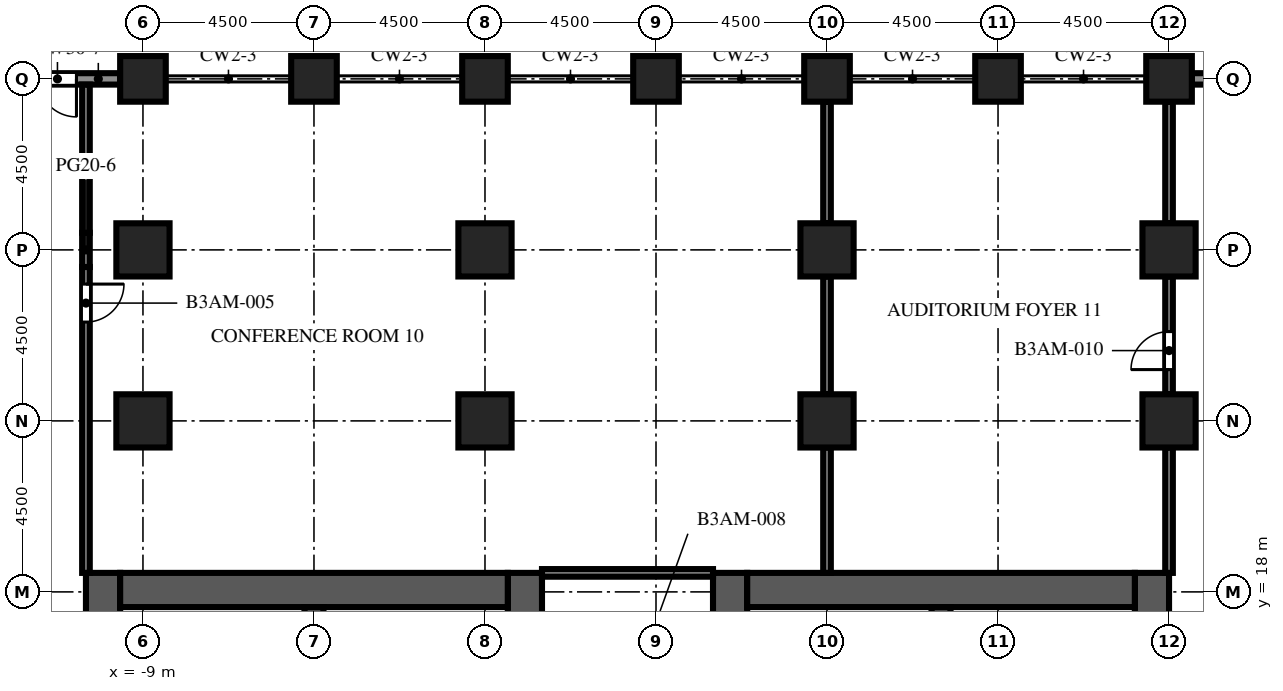
"""IFC4 building model, lengths in metres.
Left out: names, types, materials, properties, quantities, classifications, styles, units other than length and angle.
Written with IfcOpenShell. Run it as: python <this file> out.ifc"""

import sys

from ifc_helpers import new_model, si_unit, direction, frame, frame_2d, origin, origin_2d, place, context, subcontext, project, spatial, rectangle, extrude, element, fill, save


model = new_model("IFC4")
c1 = context("Model", 3, precision=1e-05, world=origin(), true_north=direction((0.0, 1.0)))
c2 = subcontext(c1, "Body", "Model", "MODEL_VIEW")
j1 = project(units=[si_unit("LENGTHUNIT", "METRE"), si_unit("PLANEANGLEUNIT", "RADIAN")], contexts=[c1])
p1 = place(None, origin())
s1 = spatial("IfcSite", under=j1, at=p1, CompositionType="ELEMENT")
p2 = place(p1, origin())
s2 = spatial("IfcBuilding", under=s1, at=p2, CompositionType="ELEMENT")
p3 = place(p2, frame((0.0, 0.0, 110.7)))
s3 = spatial("IfcBuildingStorey", under=s2, at=p3, CompositionType="ELEMENT", Elevation=110.7)
for number, where, z_axis, x_axis in (
    (1, (-9.0, 31.5, 0.0), (0.0, 0.0, 1.0), (1.0, 0.0, 0.0)),
    (2, (-4.5, 31.5, 0.0), (0.0, 0.0, 1.0), (1.0, 0.0, 0.0)),
    (3, (0.0, 31.5, 0.0), (0.0, 0.0, 1.0), (1.0, 0.0, 0.0)),
    (4, (4.5, 31.5, 0.0), (0.0, 0.0, 1.0), (1.0, 0.0, 0.0)),
    (5, (9.0, 31.5, 0.0), (0.0, 0.0, 1.0), (1.0, 0.0, 0.0)),
    (6, (13.5, 31.5, 0.0), (0.0, 0.0, 1.0), (1.0, 0.0, 0.0)),
    (7, (18.0, 31.5, 0.0), (0.0, 0.0, 1.0), (1.0, 0.0, 0.0)),
):
    element("IfcColumn", number, at=place(p3, frame(where, z_axis=z_axis, x_axis=x_axis)), inside=s3, PredefinedType="COLUMN", context=c2, shape_type="SweptSolid", body=[
        extrude(rectangle(XDim=1.2, YDim=1.2, at=origin_2d()), origin(), (0.0, 0.0, 1.0), 6.0),
    ])
p4 = place(p3, frame((-9.0, 22.5, 0.0), z_axis=(0.0, 0.0, 1.0), x_axis=(1.0, 0.0, 0.0)))
e8 = element("IfcColumn", 8, at=p4, inside=s3, PredefinedType="COLUMN", context=c2, shape_type="SweptSolid", body=[
    extrude(rectangle(XDim=1.4, YDim=1.4, at=origin_2d()), origin(), (0.0, 0.0, 1.0), 6.0),
])
p5 = place(p3, frame((-9.0, 27.0, 0.0), z_axis=(0.0, 0.0, 1.0), x_axis=(1.0, 0.0, 0.0)))
e9 = element("IfcColumn", 9, at=p5, inside=s3, PredefinedType="COLUMN", context=c2, shape_type="SweptSolid", body=[
    extrude(rectangle(XDim=1.4, YDim=1.4, at=origin_2d()), origin(), (0.0, 0.0, 1.0), 5.55),
])
for number, where, z_axis, x_axis in (
    (10, (0.0, 22.5, 0.0), (0.0, 0.0, 1.0), (1.0, 0.0, 0.0)),
    (11, (0.0, 27.0, 0.0), (0.0, 0.0, 1.0), (1.0, 0.0, 0.0)),
    (12, (9.0, 22.5, 0.0), (0.0, 0.0, 1.0), (1.0, 0.0, 0.0)),
    (13, (9.0, 27.0, 0.0), (0.0, 0.0, 1.0), (1.0, 0.0, 0.0)),
    (14, (18.0, 22.5, 0.0), (0.0, 0.0, 1.0), (1.0, 0.0, 0.0)),
    (15, (18.0, 27.0, 0.0), (0.0, 0.0, 1.0), (1.0, 0.0, 0.0)),
):
    element("IfcColumn", number, at=place(p3, frame(where, z_axis=z_axis, x_axis=x_axis)), inside=s3, PredefinedType="COLUMN", context=c2, shape_type="SweptSolid", body=[
        extrude(rectangle(XDim=1.4, YDim=1.4, at=origin_2d()), origin(), (0.0, 0.0, 1.0), 6.0),
    ])
p6 = place(p3, frame((-10.05, -9.0, 0.0), z_axis=(0.0, 0.0, 1.0), x_axis=(0.0, 1.0, 0.0)))
e16 = element("IfcWall", 16, at=p6, inside=s3, PredefinedType="SHEAR", context=c2, shape_type="SweptSolid", body=[
    extrude(rectangle(XDim=27.5, YDim=0.9, at=frame_2d((13.75, 0.0))), origin(), (0.0, 0.0, 1.0), 6.0),
])
p7 = place(p6, frame((12.55, 0.0, 0.0)))
e17 = element("IfcOpeningElement", 17, at=p7, cuts=e16, PredefinedType="OPENING", context=c2, shape_type="SweptSolid", body=[
    extrude(rectangle(XDim=2.4, YDim=2.4, at=frame_2d((1.2, 1.2))), frame((0.0, 0.46, 0.0), z_axis=(0.0, -1.0, 0.0), x_axis=(1.0, 0.0, 0.0)), (0.0, 0.0, 1.0), 0.92),
])
p8 = place(p6, frame((6.825, 0.0, 0.0)))
e18 = element("IfcOpeningElement", 18, at=p8, cuts=e16, PredefinedType="OPENING", context=c2, shape_type="SweptSolid", body=[
    extrude(rectangle(XDim=1.2, YDim=2.1, at=frame_2d((0.6, 1.05))), frame((0.0, 0.46, 0.0), z_axis=(0.0, -1.0, 0.0), x_axis=(1.0, 0.0, 0.0)), (0.0, 0.0, 1.0), 0.92),
])
p9 = place(p6, frame((19.475, 0.0, 0.0)))
e19 = element("IfcOpeningElement", 19, at=p9, cuts=e16, PredefinedType="OPENING", context=c2, shape_type="SweptSolid", body=[
    extrude(rectangle(XDim=1.2, YDim=2.1, at=frame_2d((0.6, 1.05))), frame((0.0, 0.46, 0.0), z_axis=(0.0, -1.0, 0.0), x_axis=(1.0, 0.0, 0.0)), (0.0, 0.0, 1.0), 0.92),
])
p10 = place(p3, frame((1.05, -9.0, 0.0), z_axis=(0.0, 0.0, 1.0), x_axis=(0.0, 1.0, 0.0)))
e20 = element("IfcWall", 20, at=p10, inside=s3, PredefinedType="SHEAR", context=c2, shape_type="SweptSolid", body=[
    extrude(rectangle(XDim=27.5, YDim=0.9, at=frame_2d((13.75, 0.0))), origin(), (0.0, 0.0, 1.0), 6.0),
])
p11 = place(p10, frame((12.55, 0.0, 0.0)))
e21 = element("IfcOpeningElement", 21, at=p11, cuts=e20, PredefinedType="OPENING", context=c2, shape_type="SweptSolid", body=[
    extrude(rectangle(XDim=2.4, YDim=2.4, at=frame_2d((1.2, 1.2))), frame((0.0, 0.46, 0.0), z_axis=(0.0, -1.0, 0.0), x_axis=(1.0, 0.0, 0.0)), (0.0, 0.0, 1.0), 0.92),
])
p12 = place(p10, frame((3.975, 0.0, 0.0)))
e22 = element("IfcOpeningElement", 22, at=p12, cuts=e20, PredefinedType="OPENING", context=c2, shape_type="SweptSolid", body=[
    extrude(rectangle(XDim=1.2, YDim=2.1, at=frame_2d((0.6, 1.05))), frame((0.0, 0.46, 0.0), z_axis=(0.0, -1.0, 0.0), x_axis=(1.0, 0.0, 0.0)), (0.0, 0.0, 1.0), 0.92),
])
p13 = place(p10, frame((19.485, 0.0, 0.0)))
e23 = element("IfcOpeningElement", 23, at=p13, cuts=e20, PredefinedType="OPENING", context=c2, shape_type="SweptSolid", body=[
    extrude(rectangle(XDim=1.0, YDim=2.1, at=frame_2d((0.5, 1.05))), frame((0.0, 0.46, 0.0), z_axis=(0.0, -1.0, 0.0), x_axis=(1.0, 0.0, 0.0)), (0.0, 0.0, 1.0), 0.92),
])
p14 = place(p10, frame((21.139, 0.0, 0.0)))
e24 = element("IfcOpeningElement", 24, at=p14, cuts=e20, PredefinedType="OPENING", context=c2, shape_type="SweptSolid", body=[
    extrude(rectangle(XDim=1.0, YDim=2.1, at=frame_2d((0.5, 1.05))), frame((0.0, 0.46, 0.0), z_axis=(0.0, -1.0, 0.0), x_axis=(1.0, 0.0, 0.0)), (0.0, 0.0, 1.0), 0.92),
])
p15 = place(p10, frame((23.16, 0.0, 0.0)))
e25 = element("IfcOpeningElement", 25, at=p15, cuts=e20, PredefinedType="OPENING", context=c2, shape_type="SweptSolid", body=[
    extrude(rectangle(XDim=1.0, YDim=2.1, at=frame_2d((0.5, 1.05))), frame((0.0, 0.46, 0.0), z_axis=(0.0, -1.0, 0.0), x_axis=(1.0, 0.0, 0.0)), (0.0, 0.0, 1.0), 0.92),
])
p16 = place(p10, frame((25.181, 0.0, 0.0)))
e26 = element("IfcOpeningElement", 26, at=p16, cuts=e20, PredefinedType="OPENING", context=c2, shape_type="SweptSolid", body=[
    extrude(rectangle(XDim=1.0, YDim=2.1, at=frame_2d((0.5, 1.05))), frame((0.0, 0.46, 0.0), z_axis=(0.0, -1.0, 0.0), x_axis=(1.0, 0.0, 0.0)), (0.0, 0.0, 1.0), 0.92),
])
p17 = place(p3, frame((-9.6, 18.05, 0.0), z_axis=(0.0, 0.0, 1.0), x_axis=(1.0, 0.0, 0.0)))
e27 = element("IfcWall", 27, at=p17, inside=s3, PredefinedType="SHEAR", context=c2, shape_type="SweptSolid", body=[
    extrude(rectangle(XDim=10.2, YDim=0.9, at=frame_2d((5.1, 0.0))), origin(), (0.0, 0.0, 1.0), 6.0),
])
p18 = place(p3, frame((-4.5, 10.25, 0.0), z_axis=(0.0, 0.0, 1.0), x_axis=(0.0, 1.0, 0.0)))
e28 = element("IfcWall", 28, at=p18, inside=s3, PredefinedType="SHEAR", context=c2, shape_type="SweptSolid", body=[
    extrude(rectangle(XDim=7.35, YDim=0.5, at=frame_2d((3.675, 0.0))), origin(), (0.0, 0.0, 1.0), 6.0),
])
p19 = place(p3, frame((6.45, -9.0, 0.0), z_axis=(0.0, 0.0, 1.0), x_axis=(0.0, 1.0, 0.0)))
e29 = element("IfcWall", 29, at=p19, inside=s3, PredefinedType="SHEAR", context=c2, shape_type="SweptSolid", body=[
    extrude(rectangle(XDim=27.5, YDim=0.9, at=frame_2d((13.75, 0.0))), origin(), (0.0, 0.0, 1.0), 6.0),
])
p20 = place(p19, frame((12.55, 0.0, 0.0)))
e30 = element("IfcOpeningElement", 30, at=p20, cuts=e29, PredefinedType="OPENING", context=c2, shape_type="SweptSolid", body=[
    extrude(rectangle(XDim=2.4, YDim=2.4, at=frame_2d((1.2, 1.2))), frame((0.0, 0.46, 0.0), z_axis=(0.0, -1.0, 0.0), x_axis=(1.0, 0.0, 0.0)), (0.0, 0.0, 1.0), 0.92),
])
p21 = place(p19, frame((3.975, 0.0, 0.0)))
e31 = element("IfcOpeningElement", 31, at=p21, cuts=e29, PredefinedType="OPENING", context=c2, shape_type="SweptSolid", body=[
    extrude(rectangle(XDim=1.2, YDim=2.1, at=frame_2d((0.6, 1.05))), frame((0.0, 0.46, 0.0), z_axis=(0.0, -1.0, 0.0), x_axis=(1.0, 0.0, 0.0)), (0.0, 0.0, 1.0), 0.92),
])
p22 = place(p19, frame((19.485, 0.0, 0.0)))
e32 = element("IfcOpeningElement", 32, at=p22, cuts=e29, PredefinedType="OPENING", context=c2, shape_type="SweptSolid", body=[
    extrude(rectangle(XDim=1.0, YDim=2.1, at=frame_2d((0.5, 1.05))), frame((0.0, 0.46, 0.0), z_axis=(0.0, -1.0, 0.0), x_axis=(1.0, 0.0, 0.0)), (0.0, 0.0, 1.0), 0.92),
])
p23 = place(p19, frame((21.139, 0.0, 0.0)))
e33 = element("IfcOpeningElement", 33, at=p23, cuts=e29, PredefinedType="OPENING", context=c2, shape_type="SweptSolid", body=[
    extrude(rectangle(XDim=1.0, YDim=2.1, at=frame_2d((0.5, 1.05))), frame((0.0, 0.46, 0.0), z_axis=(0.0, -1.0, 0.0), x_axis=(1.0, 0.0, 0.0)), (0.0, 0.0, 1.0), 0.92),
])
p24 = place(p19, frame((23.16, 0.0, 0.0)))
e34 = element("IfcOpeningElement", 34, at=p24, cuts=e29, PredefinedType="OPENING", context=c2, shape_type="SweptSolid", body=[
    extrude(rectangle(XDim=1.0, YDim=2.1, at=frame_2d((0.5, 1.05))), frame((0.0, 0.46, 0.0), z_axis=(0.0, -1.0, 0.0), x_axis=(1.0, 0.0, 0.0)), (0.0, 0.0, 1.0), 0.92),
])
p25 = place(p19, frame((25.181, 0.0, 0.0)))
e35 = element("IfcOpeningElement", 35, at=p25, cuts=e29, PredefinedType="OPENING", context=c2, shape_type="SweptSolid", body=[
    extrude(rectangle(XDim=1.0, YDim=2.1, at=frame_2d((0.5, 1.05))), frame((0.0, 0.46, 0.0), z_axis=(0.0, -1.0, 0.0), x_axis=(1.0, 0.0, 0.0)), (0.0, 0.0, 1.0), 0.92),
])
p26 = place(p3, frame((17.55, -9.0, 0.0), z_axis=(0.0, 0.0, 1.0), x_axis=(0.0, 1.0, 0.0)))
e36 = element("IfcWall", 36, at=p26, inside=s3, PredefinedType="SHEAR", context=c2, shape_type="SweptSolid", body=[
    extrude(rectangle(XDim=27.5, YDim=0.9, at=frame_2d((13.75, 0.0))), origin(), (0.0, 0.0, 1.0), 6.0),
])
p27 = place(p26, frame((12.55, 0.0, 0.0)))
e37 = element("IfcOpeningElement", 37, at=p27, cuts=e36, PredefinedType="OPENING", context=c2, shape_type="SweptSolid", body=[
    extrude(rectangle(XDim=2.4, YDim=2.4, at=frame_2d((1.2, 1.2))), frame((0.0, 0.46, 0.0), z_axis=(0.0, -1.0, 0.0), x_axis=(1.0, 0.0, 0.0)), (0.0, 0.0, 1.0), 0.92),
])
p28 = place(p26, frame((6.825, 0.0, 0.0)))
e38 = element("IfcOpeningElement", 38, at=p28, cuts=e36, PredefinedType="OPENING", context=c2, shape_type="SweptSolid", body=[
    extrude(rectangle(XDim=1.2, YDim=2.1, at=frame_2d((0.6, 1.05))), frame((0.0, 0.46, 0.0), z_axis=(0.0, -1.0, 0.0), x_axis=(1.0, 0.0, 0.0)), (0.0, 0.0, 1.0), 0.92),
])
p29 = place(p26, frame((19.475, 0.0, 0.0)))
e39 = element("IfcOpeningElement", 39, at=p29, cuts=e36, PredefinedType="OPENING", context=c2, shape_type="SweptSolid", body=[
    extrude(rectangle(XDim=1.2, YDim=2.1, at=frame_2d((0.6, 1.05))), frame((0.0, 0.46, 0.0), z_axis=(0.0, -1.0, 0.0), x_axis=(1.0, 0.0, 0.0)), (0.0, 0.0, 1.0), 0.92),
])
p30 = place(p3, frame((6.9, 18.05, 0.0), z_axis=(0.0, 0.0, 1.0), x_axis=(1.0, 0.0, 0.0)))
e40 = element("IfcWall", 40, at=p30, inside=s3, PredefinedType="SHEAR", context=c2, shape_type="SweptSolid", body=[
    extrude(rectangle(XDim=10.2, YDim=0.9, at=frame_2d((5.1, 0.0))), origin(), (0.0, 0.0, 1.0), 6.0),
])
p31 = place(p3, frame((12.0, 10.25, 0.0), z_axis=(0.0, 0.0, 1.0), x_axis=(0.0, 1.0, 0.0)))
e41 = element("IfcWall", 41, at=p31, inside=s3, PredefinedType="SHEAR", context=c2, shape_type="SweptSolid", body=[
    extrude(rectangle(XDim=7.35, YDim=0.5, at=frame_2d((3.675, 0.0))), origin(), (0.0, 0.0, 1.0), 6.0),
])
p32 = place(p3, frame((18.6, 31.5, 0.0), z_axis=(0.0, 0.0, 1.0), x_axis=(1.0, 0.0, 0.0)))
e42 = element("IfcWall", 42, at=p32, inside=s3, PredefinedType="SOLIDWALL", context=c2, shape_type="SweptSolid", body=[
    extrude(rectangle(XDim=3.3, YDim=0.3, at=frame_2d((1.65, 0.0))), origin(), (0.0, 0.0, 1.0), 4.65),
])
p33 = place(p32, frame((1.15, 0.0, 0.0)))
e43 = element("IfcOpeningElement", 43, at=p33, cuts=e42, PredefinedType="OPENING", context=c2, shape_type="SweptSolid", body=[
    extrude(rectangle(XDim=1.0, YDim=2.2, at=frame_2d((0.5, 1.1))), frame((0.0, 0.16, 0.0), z_axis=(0.0, -1.0, 0.0), x_axis=(1.0, 0.0, 0.0)), (0.0, 0.0, 1.0), 0.32),
])
p34 = place(p3, frame((-12.9, 31.5, 0.0), z_axis=(0.0, 0.0, 1.0), x_axis=(1.0, 0.0, 0.0)))
e44 = element("IfcWall", 44, at=p34, inside=s3, PredefinedType="SOLIDWALL", context=c2, shape_type="SweptSolid", body=[
    extrude(rectangle(XDim=3.3, YDim=0.3, at=frame_2d((1.65, 0.0))), origin(), (0.0, 0.0, 1.0), 4.65),
])
p35 = place(p34, frame((1.15, 0.0, 0.0)))
e45 = element("IfcOpeningElement", 45, at=p35, cuts=e44, PredefinedType="OPENING", context=c2, shape_type="SweptSolid", body=[
    extrude(rectangle(XDim=1.0, YDim=2.2, at=frame_2d((0.5, 1.1))), frame((0.0, 0.16, 0.0), z_axis=(0.0, -1.0, 0.0), x_axis=(1.0, 0.0, 0.0)), (0.0, 0.0, 1.0), 0.32),
])
p36 = place(p3, frame((-10.5, 26.55, 0.0), z_axis=(0.0, 0.0, 1.0), x_axis=(0.0, -1.0, 0.0)))
e46 = element("IfcWall", 46, at=p36, inside=s3, PredefinedType="PARTITIONING", context=c2, shape_type="SweptSolid", body=[
    extrude(rectangle(XDim=8.05, YDim=0.2, at=frame_2d((4.025, 0.0))), origin(), (0.0, 0.0, 1.0), 5.55),
])
p37 = place(p36, frame((0.45, 0.0, 0.0)))
e47 = element("IfcOpeningElement", 47, at=p37, cuts=e46, PredefinedType="OPENING", context=c2, shape_type="SweptSolid", body=[
    extrude(rectangle(XDim=1.0, YDim=2.1, at=frame_2d((0.5, 1.05))), frame((0.0, 0.11, 0.0), z_axis=(0.0, -1.0, 0.0), x_axis=(1.0, 0.0, 0.0)), (0.0, 0.0, 1.0), 0.22),
])
p38 = place(p3, frame((-10.5, 26.55, 0.0), z_axis=(0.0, 0.0, 1.0), x_axis=(0.0, 1.0, 0.0)))
e48 = element("IfcWall", 48, at=p38, inside=s3, PredefinedType="PARTITIONING", context=c2, shape_type="SweptSolid", body=[
    extrude(rectangle(XDim=0.9, YDim=0.2, at=frame_2d((0.45, 0.0))), origin(), (0.0, 0.0, 1.0), 3.72),
])
p39 = place(p3, frame((-10.5, 27.45, 0.0), z_axis=(0.0, 0.0, 1.0), x_axis=(0.0, 1.0, 0.0)))
e49 = element("IfcWall", 49, at=p39, inside=s3, PredefinedType="PARTITIONING", context=c2, shape_type="SweptSolid", body=[
    extrude(rectangle(XDim=3.9, YDim=0.2, at=frame_2d((1.95, 0.0))), origin(), (0.0, 0.0, 1.0), 5.55),
])
p40 = place(p3, frame((9.0, 18.5, 0.0), z_axis=(0.0, 0.0, 1.0), x_axis=(0.0, 1.0, 0.0)))
e50 = element("IfcWall", 50, at=p40, inside=s3, PredefinedType="PARTITIONING", context=c2, shape_type="SweptSolid", body=[
    extrude(rectangle(XDim=3.3, YDim=0.2, at=frame_2d((1.65, 0.0))), origin(), (0.0, 0.0, 1.0), 5.55),
])
p41 = place(p3, frame((9.0, 23.2, 0.0), z_axis=(0.0, 0.0, 1.0), x_axis=(0.0, 1.0, 0.0)))
e51 = element("IfcWall", 51, at=p41, inside=s3, PredefinedType="PARTITIONING", context=c2, shape_type="SweptSolid", body=[
    extrude(rectangle(XDim=3.1, YDim=0.2, at=frame_2d((1.55, 0.0))), origin(), (0.0, 0.0, 1.0), 5.55),
])
p42 = place(p3, frame((9.0, 27.7, 0.0), z_axis=(0.0, 0.0, 1.0), x_axis=(0.0, 1.0, 0.0)))
e52 = element("IfcWall", 52, at=p42, inside=s3, PredefinedType="PARTITIONING", context=c2, shape_type="SweptSolid", body=[
    extrude(rectangle(XDim=3.2, YDim=0.2, at=frame_2d((1.6, 0.0))), origin(), (0.0, 0.0, 1.0), 5.55),
])
p43 = place(p3, frame((18.0, 18.5, 0.0), z_axis=(0.0, 0.0, 1.0), x_axis=(0.0, 1.0, 0.0)))
e53 = element("IfcWall", 53, at=p43, inside=s3, PredefinedType="PARTITIONING", context=c2, shape_type="SweptSolid", body=[
    extrude(rectangle(XDim=3.3, YDim=0.2, at=frame_2d((1.65, 0.0))), origin(), (0.0, 0.0, 1.0), 5.55),
])
p44 = place(p3, frame((18.0, 23.2, 0.0), z_axis=(0.0, 0.0, 1.0), x_axis=(0.0, 1.0, 0.0)))
e54 = element("IfcWall", 54, at=p44, inside=s3, PredefinedType="PARTITIONING", context=c2, shape_type="SweptSolid", body=[
    extrude(rectangle(XDim=3.1, YDim=0.2, at=frame_2d((1.55, 0.0))), origin(), (0.0, 0.0, 1.0), 5.55),
])
p45 = place(p44, frame((0.65, 0.0, 0.0)))
e55 = element("IfcOpeningElement", 55, at=p45, cuts=e54, PredefinedType="OPENING", context=c2, shape_type="SweptSolid", body=[
    extrude(rectangle(XDim=1.0, YDim=2.1, at=frame_2d((0.5, 1.05))), frame((0.0, 0.11, 0.0), z_axis=(0.0, -1.0, 0.0), x_axis=(1.0, 0.0, 0.0)), (0.0, 0.0, 1.0), 0.22),
])
p46 = place(p3, frame((18.0, 27.7, 0.0), z_axis=(0.0, 0.0, 1.0), x_axis=(0.0, 1.0, 0.0)))
e56 = element("IfcWall", 56, at=p46, inside=s3, PredefinedType="PARTITIONING", context=c2, shape_type="SweptSolid", body=[
    extrude(rectangle(XDim=3.2, YDim=0.2, at=frame_2d((1.6, 0.0))), origin(), (0.0, 0.0, 1.0), 5.55),
])
p47 = place(p3, frame((1.5, 18.5, 0.0), z_axis=(0.0, 0.0, 1.0), x_axis=(1.0, 0.0, 0.0)))
e57 = element("IfcWall", 57, at=p47, inside=s3, PredefinedType="PARTITIONING", context=c2, shape_type="SweptSolid", body=[
    extrude(rectangle(XDim=4.5, YDim=0.2, at=frame_2d((2.25, 0.0))), origin(), (0.0, 0.0, 1.0), 5.55),
])
p48 = place(p35, origin())
e58 = element("IfcDoor", 58, at=p48, inside=s3, OperationType="SINGLE_SWING_RIGHT", PredefinedType="DOOR", context=c2, shape_type="SweptSolid", body=[
    extrude(rectangle(XDim=1.0, YDim=2.2, at=frame_2d((0.5, 1.1))), frame((0.0, 0.025, 0.0), z_axis=(0.0, -1.0, 0.0), x_axis=(1.0, 0.0, 0.0)), (0.0, 0.0, 1.0), 0.05),
])
fill(e45, e58)
p49 = place(p37, origin())
e59 = element("IfcDoor", 59, at=p49, inside=s3, OperationType="SINGLE_SWING_LEFT", PredefinedType="DOOR", context=c2, shape_type="SweptSolid", body=[
    extrude(rectangle(XDim=1.0, YDim=2.1, at=frame_2d((0.5, 1.05))), frame((0.0, 0.025, 0.0), z_axis=(0.0, -1.0, 0.0), x_axis=(1.0, 0.0, 0.0)), (0.0, 0.0, 1.0), 0.05),
])
fill(e47, e59)
p50 = place(p45, origin())
e60 = element("IfcDoor", 60, at=p50, inside=s3, OperationType="SINGLE_SWING_LEFT", PredefinedType="DOOR", context=c2, shape_type="SweptSolid", body=[
    extrude(rectangle(XDim=1.0, YDim=2.1, at=frame_2d((0.5, 1.05))), frame((0.0, 0.025, 0.0), z_axis=(0.0, -1.0, 0.0), x_axis=(1.0, 0.0, 0.0)), (0.0, 0.0, 1.0), 0.05),
])
fill(e55, e60)
save(model, sys.argv[1])
